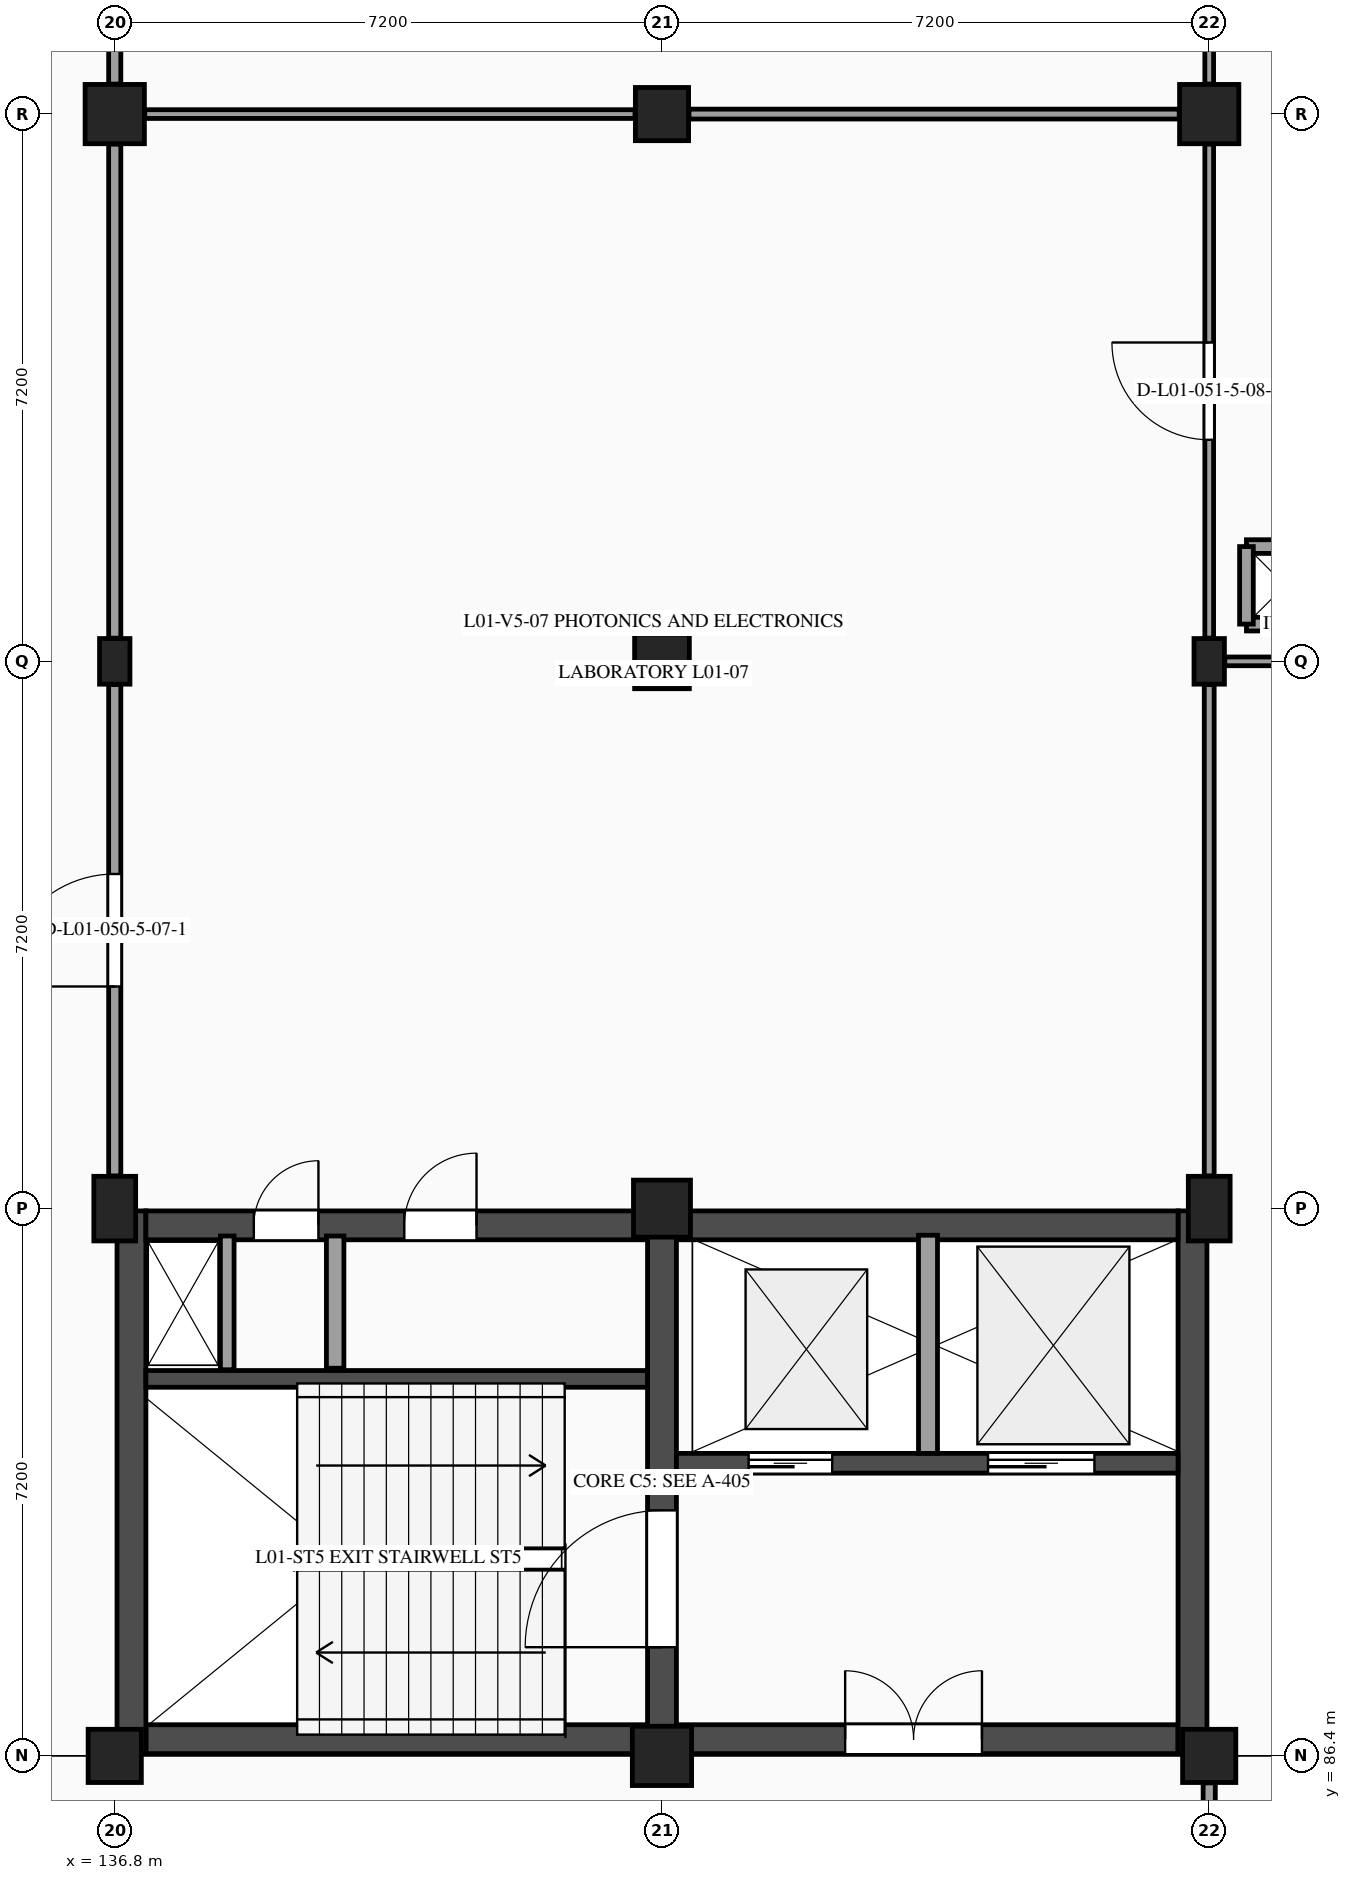
"""IFC4 building model, lengths in metres.
Left out: names, types, materials, properties, quantities, classifications, styles, units other than length and angle.
Written with IfcOpenShell. Run it as: python <this file> out.ifc"""

import sys

from ifc_helpers import new_model, si_unit, direction, frame, frame_2d, origin, origin_2d, place, context, subcontext, project, spatial, rectangle, extrude, element, fill, save


model = new_model("IFC4")
c1 = context("Model", 3, precision=1e-05, world=origin(), true_north=direction((0.0, 1.0)))
c2 = subcontext(c1, "Body", "Model", "MODEL_VIEW")
j1 = project(units=[si_unit("LENGTHUNIT", "METRE"), si_unit("PLANEANGLEUNIT", "RADIAN")], contexts=[c1])
p1 = place(None, origin())
s1 = spatial("IfcSite", under=j1, at=p1, CompositionType="ELEMENT")
p2 = place(p1, origin())
s2 = spatial("IfcBuilding", under=s1, at=p2, CompositionType="ELEMENT")
p3 = place(p2, frame((0.0, 0.0, 5.4)))
s3 = spatial("IfcBuildingStorey", under=s2, at=p3, CompositionType="ELEMENT", Elevation=5.4)
p4 = place(p3, frame((136.8, 86.4, 0.0), z_axis=(0.0, 0.0, 1.0), x_axis=(1.0, 0.0, 0.0)))
e1 = element("IfcColumn", 1, at=p4, inside=s3, PredefinedType="COLUMN", context=c2, shape_type="SweptSolid", body=[
    extrude(rectangle(XDim=0.7, YDim=0.7, at=origin_2d()), origin(), (0.0, 0.0, 1.0), 4.5),
])
p5 = place(p3, frame((136.8, 93.6, 0.0), z_axis=(0.0, 0.0, 1.0), x_axis=(1.0, 0.0, 0.0)))
e2 = element("IfcColumn", 2, at=p5, inside=s3, PredefinedType="COLUMN", context=c2, shape_type="SweptSolid", body=[
    extrude(rectangle(XDim=0.55, YDim=0.85, at=origin_2d()), origin(), (0.0, 0.0, 1.0), 4.5),
])
p6 = place(p3, frame((136.8, 100.8, 0.0), z_axis=(0.0, 0.0, 1.0), x_axis=(1.0, 0.0, 0.0)))
e3 = element("IfcColumn", 3, at=p6, inside=s3, PredefinedType="PILASTER", context=c2, shape_type="SweptSolid", body=[
    extrude(rectangle(XDim=0.4, YDim=0.6, at=origin_2d()), origin(), (0.0, 0.0, 1.0), 4.5),
])
for number, where, z_axis, x_axis in (
    (4, (136.8, 108.0, 0.0), (0.0, 0.0, 1.0), (1.0, 0.0, 0.0)),
    (5, (144.0, 86.4, 0.0), (0.0, 0.0, 1.0), (1.0, 0.0, 0.0)),
):
    element("IfcColumn", number, at=place(p3, frame(where, z_axis=z_axis, x_axis=x_axis)), inside=s3, PredefinedType="COLUMN", context=c2, shape_type="SweptSolid", body=[
        extrude(rectangle(XDim=0.78, YDim=0.78, at=origin_2d()), origin(), (0.0, 0.0, 1.0), 4.5),
    ])
p7 = place(p3, frame((144.0, 93.6, 0.0), z_axis=(0.0, 0.0, 1.0), x_axis=(1.0, 0.0, 0.0)))
e6 = element("IfcColumn", 6, at=p7, inside=s3, PredefinedType="COLUMN", context=c2, shape_type="SweptSolid", body=[
    extrude(rectangle(XDim=0.75, YDim=0.75, at=origin_2d()), origin(), (0.0, 0.0, 1.0), 4.5),
])
p8 = place(p3, frame((144.0, 100.8, 0.0), z_axis=(0.0, 0.0, 1.0), x_axis=(1.0, 0.0, 0.0)))
e7 = element("IfcColumn", 7, at=p8, inside=s3, PredefinedType="COLUMN", context=c2, shape_type="SweptSolid", body=[
    extrude(rectangle(XDim=0.72, YDim=0.72, at=origin_2d()), origin(), (0.0, 0.0, 1.0), 4.5),
])
for number, where, z_axis, x_axis in (
    (8, (144.0, 108.0, 0.0), (0.0, 0.0, 1.0), (1.0, 0.0, 0.0)),
    (9, (151.2, 86.4, 0.0), (0.0, 0.0, 1.0), (1.0, 0.0, 0.0)),
):
    element("IfcColumn", number, at=place(p3, frame(where, z_axis=z_axis, x_axis=x_axis)), inside=s3, PredefinedType="COLUMN", context=c2, shape_type="SweptSolid", body=[
        extrude(rectangle(XDim=0.7, YDim=0.7, at=origin_2d()), origin(), (0.0, 0.0, 1.0), 4.5),
    ])
p9 = place(p3, frame((151.2, 93.6, 0.0), z_axis=(0.0, 0.0, 1.0), x_axis=(1.0, 0.0, 0.0)))
e10 = element("IfcColumn", 10, at=p9, inside=s3, PredefinedType="COLUMN", context=c2, shape_type="SweptSolid", body=[
    extrude(rectangle(XDim=0.55, YDim=0.85, at=origin_2d()), origin(), (0.0, 0.0, 1.0), 4.5),
])
p10 = place(p3, frame((151.2, 100.8, 0.0), z_axis=(0.0, 0.0, 1.0), x_axis=(1.0, 0.0, 0.0)))
e11 = element("IfcColumn", 11, at=p10, inside=s3, PredefinedType="PILASTER", context=c2, shape_type="SweptSolid", body=[
    extrude(rectangle(XDim=0.4, YDim=0.6, at=origin_2d()), origin(), (0.0, 0.0, 1.0), 4.5),
])
p11 = place(p3, frame((151.2, 108.0, 0.0), z_axis=(0.0, 0.0, 1.0), x_axis=(1.0, 0.0, 0.0)))
e12 = element("IfcColumn", 12, at=p11, inside=s3, PredefinedType="COLUMN", context=c2, shape_type="SweptSolid", body=[
    extrude(rectangle(XDim=0.78, YDim=0.78, at=origin_2d()), origin(), (0.0, 0.0, 1.0), 4.5),
])
p12 = place(p3, frame((137.21, 86.62, 0.0), z_axis=(0.0, 0.0, 1.0), x_axis=(1.0, 0.0, 0.0)))
e13 = element("IfcWall", 13, at=p12, inside=s3, PredefinedType="SHEAR", context=c2, shape_type="SweptSolid", body=[
    extrude(rectangle(XDim=6.6, YDim=0.38, at=frame_2d((3.3, 0.0))), origin(), (0.0, 0.0, 1.0), 4.21),
])
p13 = place(p3, frame((137.02, 93.57, 0.0), z_axis=(0.0, 0.0, 1.0), x_axis=(0.0, -1.0, 0.0)))
e14 = element("IfcWall", 14, at=p13, inside=s3, PredefinedType="SHEAR", context=c2, shape_type="SweptSolid", body=[
    extrude(rectangle(XDim=7.14, YDim=0.38, at=frame_2d((3.57, 0.0))), origin(), (0.0, 0.0, 1.0), 4.21),
])
p14 = place(p3, frame((137.21, 93.38, 0.0), z_axis=(0.0, 0.0, 1.0), x_axis=(1.0, 0.0, 0.0)))
e15 = element("IfcWall", 15, at=p14, inside=s3, PredefinedType="SHEAR", context=c2, shape_type="SweptSolid", body=[
    extrude(rectangle(XDim=6.6, YDim=0.38, at=frame_2d((3.3, 0.0))), origin(), (0.0, 0.0, 1.0), 4.21),
])
p15 = place(p14, frame((1.42, 0.0, 0.0)))
e16 = element("IfcOpeningElement", 16, at=p15, cuts=e15, PredefinedType="OPENING", context=c2, shape_type="SweptSolid", body=[
    extrude(rectangle(XDim=0.85, YDim=2.1, at=frame_2d((0.425, 1.05))), frame((0.0, 0.2, 0.0), z_axis=(0.0, -1.0, 0.0), x_axis=(1.0, 0.0, 0.0)), (0.0, 0.0, 1.0), 0.4),
])
p16 = place(p14, frame((3.4, 0.0, 0.0)))
e17 = element("IfcOpeningElement", 17, at=p16, cuts=e15, PredefinedType="OPENING", context=c2, shape_type="SweptSolid", body=[
    extrude(rectangle(XDim=0.95, YDim=2.15, at=frame_2d((0.475, 1.075))), frame((0.0, 0.2, 0.0), z_axis=(0.0, -1.0, 0.0), x_axis=(1.0, 0.0, 0.0)), (0.0, 0.0, 1.0), 0.4),
])
p17 = place(p3, frame((137.21, 91.36, 0.0), z_axis=(0.0, 0.0, 1.0), x_axis=(1.0, 0.0, 0.0)))
e18 = element("IfcWall", 18, at=p17, inside=s3, PredefinedType="SHEAR", context=c2, shape_type="SweptSolid", body=[
    extrude(rectangle(XDim=6.6, YDim=0.22, at=frame_2d((3.3, 0.0))), origin(), (0.0, 0.0, 1.0), 4.21),
])
p18 = place(p3, frame((139.7, 91.5, 0.0), z_axis=(0.0, 0.0, 1.0), x_axis=(0.0, 1.0, 0.0)))
e19 = element("IfcWall", 19, at=p18, inside=s3, PredefinedType="PARTITIONING", context=c2, shape_type="SweptSolid", body=[
    extrude(rectangle(XDim=1.74, YDim=0.23, at=frame_2d((0.87, 0.0))), origin(), (0.0, 0.0, 1.0), 4.21),
])
p19 = place(p3, frame((138.28, 91.48, 0.0), z_axis=(0.0, 0.0, 1.0), x_axis=(0.0, 1.0, 0.0)))
e20 = element("IfcWall", 20, at=p19, inside=s3, PredefinedType="PARTITIONING", context=c2, shape_type="SweptSolid", body=[
    extrude(rectangle(XDim=1.76, YDim=0.18, at=frame_2d((0.88, 0.0))), origin(), (0.0, 0.0, 1.0), 4.21),
])
p20 = place(p3, frame((144.0, 86.43, 0.0), z_axis=(0.0, 0.0, 1.0), x_axis=(0.0, 1.0, 0.0)))
e21 = element("IfcWall", 21, at=p20, inside=s3, PredefinedType="SHEAR", context=c2, shape_type="SweptSolid", body=[
    extrude(rectangle(XDim=7.14, YDim=0.38, at=frame_2d((3.57, 0.0))), origin(), (0.0, 0.0, 1.0), 4.21),
])
p21 = place(p20, frame((1.4, 0.0, 0.0)))
e22 = element("IfcOpeningElement", 22, at=p21, cuts=e21, PredefinedType="OPENING", context=c2, shape_type="SweptSolid", body=[
    extrude(rectangle(XDim=1.8, YDim=2.2, at=frame_2d((0.9, 1.1))), frame((0.0, 0.2, 0.0), z_axis=(0.0, -1.0, 0.0), x_axis=(1.0, 0.0, 0.0)), (0.0, 0.0, 1.0), 0.4),
])
p22 = place(p3, frame((144.19, 86.62, 0.0), z_axis=(0.0, 0.0, 1.0), x_axis=(1.0, 0.0, 0.0)))
e23 = element("IfcWall", 23, at=p22, inside=s3, PredefinedType="SHEAR", context=c2, shape_type="SweptSolid", body=[
    extrude(rectangle(XDim=6.6, YDim=0.38, at=frame_2d((3.3, 0.0))), origin(), (0.0, 0.0, 1.0), 4.21),
])
p23 = place(p22, frame((2.22, 0.0, 0.0)))
e24 = element("IfcOpeningElement", 24, at=p23, cuts=e23, PredefinedType="OPENING", context=c2, shape_type="SweptSolid", body=[
    extrude(rectangle(XDim=1.8, YDim=2.2, at=frame_2d((0.9, 1.1))), frame((0.0, 0.2, 0.0), z_axis=(0.0, -1.0, 0.0), x_axis=(1.0, 0.0, 0.0)), (0.0, 0.0, 1.0), 0.4),
])
p24 = place(p3, frame((150.98, 86.43, 0.0), z_axis=(0.0, 0.0, 1.0), x_axis=(0.0, 1.0, 0.0)))
e25 = element("IfcWall", 25, at=p24, inside=s3, PredefinedType="SHEAR", context=c2, shape_type="SweptSolid", body=[
    extrude(rectangle(XDim=7.14, YDim=0.38, at=frame_2d((3.57, 0.0))), origin(), (0.0, 0.0, 1.0), 4.21),
])
p25 = place(p3, frame((144.19, 93.38, 0.0), z_axis=(0.0, 0.0, 1.0), x_axis=(1.0, 0.0, 0.0)))
e26 = element("IfcWall", 26, at=p25, inside=s3, PredefinedType="SHEAR", context=c2, shape_type="SweptSolid", body=[
    extrude(rectangle(XDim=6.6, YDim=0.38, at=frame_2d((3.3, 0.0))), origin(), (0.0, 0.0, 1.0), 4.21),
])
p26 = place(p3, frame((144.19, 90.25, 0.0), z_axis=(0.0, 0.0, 1.0), x_axis=(1.0, 0.0, 0.0)))
e27 = element("IfcWall", 27, at=p26, inside=s3, PredefinedType="SHEAR", context=c2, shape_type="SweptSolid", body=[
    extrude(rectangle(XDim=6.6, YDim=0.26, at=frame_2d((3.3, 0.0))), origin(), (0.0, 0.0, 1.0), 4.21),
])
p27 = place(p26, frame((0.95, 0.0, 0.0)))
e28 = element("IfcOpeningElement", 28, at=p27, cuts=e27, PredefinedType="OPENING", context=c2, shape_type="SweptSolid", body=[
    extrude(rectangle(XDim=1.1, YDim=2.2, at=frame_2d((0.55, 1.1))), frame((0.0, 0.14, 0.0), z_axis=(0.0, -1.0, 0.0), x_axis=(1.0, 0.0, 0.0)), (0.0, 0.0, 1.0), 0.28),
])
p28 = place(p26, frame((4.1, 0.0, 0.0)))
e29 = element("IfcOpeningElement", 29, at=p28, cuts=e27, PredefinedType="OPENING", context=c2, shape_type="SweptSolid", body=[
    extrude(rectangle(XDim=1.4, YDim=2.3, at=frame_2d((0.7, 1.15))), frame((0.0, 0.14, 0.0), z_axis=(0.0, -1.0, 0.0), x_axis=(1.0, 0.0, 0.0)), (0.0, 0.0, 1.0), 0.28),
])
p29 = place(p3, frame((147.5, 90.38, 0.0), z_axis=(0.0, 0.0, 1.0), x_axis=(0.0, 1.0, 0.0)))
e30 = element("IfcWall", 30, at=p29, inside=s3, PredefinedType="PARTITIONING", context=c2, shape_type="SweptSolid", body=[
    extrude(rectangle(XDim=2.87, YDim=0.25, at=frame_2d((1.435, 0.0))), origin(), (0.0, 0.0, 1.0), 4.21),
])
for number, where, z_axis, x_axis in (
    (31, (151.69, 101.29, 0.0), (0.0, 0.0, 1.0), (1.0, 0.0, 0.0)),
    (32, (152.71, 102.31, 0.0), (0.0, 0.0, 1.0), (-1.0, 0.0, 0.0)),
    (33, (151.69, 102.31, 0.0), (0.0, 0.0, 1.0), (0.0, -1.0, 0.0)),
):
    element("IfcWall", number, at=place(p3, frame(where, z_axis=z_axis, x_axis=x_axis)), inside=s3, PredefinedType="PARTITIONING", context=c2, shape_type="SweptSolid", body=[
        extrude(rectangle(XDim=1.02, YDim=0.18, at=frame_2d((0.51, 0.0))), origin(), (0.0, 0.0, 1.0), 4.21),
    ])
p30 = place(p3, frame((136.8, 94.03, 0.0), z_axis=(0.0, 0.0, 1.0), x_axis=(0.0, 1.0, 0.0)))
e34 = element("IfcWall", 34, at=p30, inside=s3, PredefinedType="PARTITIONING", context=c2, shape_type="SweptSolid", body=[
    extrude(rectangle(XDim=6.465, YDim=0.16, at=frame_2d((3.232, 0.0))), origin(), (0.0, 0.0, 1.0), 3.575),
])
p31 = place(p30, frame((2.492, 0.0, 0.0)))
e35 = element("IfcOpeningElement", 35, at=p31, cuts=e34, PredefinedType="OPENING", context=c2, shape_type="SweptSolid", body=[
    extrude(rectangle(XDim=1.48, YDim=2.28, at=frame_2d((0.74, 1.14))), frame((0.0, 0.09, 0.0), z_axis=(0.0, -1.0, 0.0), x_axis=(1.0, 0.0, 0.0)), (0.0, 0.0, 1.0), 0.18),
])
p32 = place(p3, frame((136.8, 101.105, 0.0), z_axis=(0.0, 0.0, 1.0), x_axis=(0.0, 1.0, 0.0)))
e36 = element("IfcWall", 36, at=p32, inside=s3, PredefinedType="PARTITIONING", context=c2, shape_type="SweptSolid", body=[
    extrude(rectangle(XDim=6.5, YDim=0.16, at=frame_2d((3.25, 0.0))), origin(), (0.0, 0.0, 1.0), 3.525),
])
p33 = place(p3, frame((136.8, 108.395, 0.0), z_axis=(0.0, 0.0, 1.0), x_axis=(0.0, 1.0, 0.0)))
e37 = element("IfcWall", 37, at=p33, inside=s3, PredefinedType="PARTITIONING", context=c2, shape_type="SweptSolid", body=[
    extrude(rectangle(XDim=6.425, YDim=0.16, at=frame_2d((3.212, 0.0))), origin(), (0.0, 0.0, 1.0), 3.525),
])
p34 = place(p33, frame((2.663, 0.0, 0.0)))
e38 = element("IfcOpeningElement", 38, at=p34, cuts=e37, PredefinedType="OPENING", context=c2, shape_type="SweptSolid", body=[
    extrude(rectangle(XDim=1.1, YDim=2.15, at=frame_2d((0.55, 1.075))), frame((0.0, 0.09, 0.0), z_axis=(0.0, -1.0, 0.0), x_axis=(1.0, 0.0, 0.0)), (0.0, 0.0, 1.0), 0.18),
])
p35 = place(p3, frame((137.195, 108.0, 0.0), z_axis=(0.0, 0.0, 1.0), x_axis=(1.0, 0.0, 0.0)))
e39 = element("IfcWall", 39, at=p35, inside=s3, PredefinedType="PARTITIONING", context=c2, shape_type="SweptSolid", body=[
    extrude(rectangle(XDim=6.45, YDim=0.115, at=frame_2d((3.225, 0.0))), origin(), (0.0, 0.0, 1.0), 3.43),
])
p36 = place(p3, frame((151.2, 79.565, 0.0), z_axis=(0.0, 0.0, 1.0), x_axis=(0.0, 1.0, 0.0)))
e40 = element("IfcWall", 40, at=p36, inside=s3, PredefinedType="PARTITIONING", context=c2, shape_type="SweptSolid", body=[
    extrude(rectangle(XDim=6.48, YDim=0.16, at=frame_2d((3.24, 0.0))), origin(), (0.0, 0.0, 1.0), 3.515),
])
p37 = place(p36, frame((2.55, 0.0, 0.0)))
e41 = element("IfcOpeningElement", 41, at=p37, cuts=e40, PredefinedType="OPENING", context=c2, shape_type="SweptSolid", body=[
    extrude(rectangle(XDim=1.38, YDim=2.22, at=frame_2d((0.69, 1.11))), frame((0.0, 0.09, 0.0), z_axis=(0.0, -1.0, 0.0), x_axis=(1.0, 0.0, 0.0)), (0.0, 0.0, 1.0), 0.18),
])
p38 = place(p3, frame((151.2, 94.03, 0.0), z_axis=(0.0, 0.0, 1.0), x_axis=(0.0, 1.0, 0.0)))
e42 = element("IfcWall", 42, at=p38, inside=s3, PredefinedType="PARTITIONING", context=c2, shape_type="SweptSolid", body=[
    extrude(rectangle(XDim=6.465, YDim=0.13, at=frame_2d((3.232, 0.0))), origin(), (0.0, 0.0, 1.0), 3.575),
])
p39 = place(p3, frame((151.2, 101.105, 0.0), z_axis=(0.0, 0.0, 1.0), x_axis=(0.0, 1.0, 0.0)))
e43 = element("IfcWall", 43, at=p39, inside=s3, PredefinedType="PARTITIONING", context=c2, shape_type="SweptSolid", body=[
    extrude(rectangle(XDim=6.5, YDim=0.115, at=frame_2d((3.25, 0.0))), origin(), (0.0, 0.0, 1.0), 3.525),
])
p40 = place(p39, frame((2.61, 0.0, 0.0)))
e44 = element("IfcOpeningElement", 44, at=p40, cuts=e43, PredefinedType="OPENING", context=c2, shape_type="SweptSolid", body=[
    extrude(rectangle(XDim=1.28, YDim=2.24, at=frame_2d((0.64, 1.12))), frame((0.0, 0.067, 0.0), z_axis=(0.0, -1.0, 0.0), x_axis=(1.0, 0.0, 0.0)), (0.0, 0.0, 1.0), 0.135),
])
p41 = place(p3, frame((144.355, 108.0, 0.0), z_axis=(0.0, 0.0, 1.0), x_axis=(1.0, 0.0, 0.0)))
e45 = element("IfcWall", 45, at=p41, inside=s3, PredefinedType="PARTITIONING", context=c2, shape_type="SweptSolid", body=[
    extrude(rectangle(XDim=6.45, YDim=0.13, at=frame_2d((3.225, 0.0))), origin(), (0.0, 0.0, 1.0), 3.46),
])
p42 = place(p3, frame((151.2, 108.395, 0.0), z_axis=(0.0, 0.0, 1.0), x_axis=(0.0, 1.0, 0.0)))
e46 = element("IfcWall", 46, at=p42, inside=s3, PredefinedType="PARTITIONING", context=c2, shape_type="SweptSolid", body=[
    extrude(rectangle(XDim=6.425, YDim=0.115, at=frame_2d((3.212, 0.0))), origin(), (0.0, 0.0, 1.0), 3.525),
])
p43 = place(p3, frame((151.405, 100.8, 0.0), z_axis=(0.0, 0.0, 1.0), x_axis=(1.0, 0.0, 0.0)))
e47 = element("IfcWall", 47, at=p43, inside=s3, PredefinedType="PARTITIONING", context=c2, shape_type="SweptSolid", body=[
    extrude(rectangle(XDim=6.63, YDim=0.115, at=frame_2d((3.315, 0.0))), origin(), (0.0, 0.0, 1.0), 3.47),
])
p44 = place(p15, origin())
e48 = element("IfcDoor", 48, at=p44, inside=s3, OperationType="SINGLE_SWING_RIGHT", PredefinedType="DOOR", context=c2, shape_type="SweptSolid", body=[
    extrude(rectangle(XDim=0.85, YDim=2.1, at=frame_2d((0.425, 1.05))), frame((0.0, 0.025, 0.0), z_axis=(0.0, -1.0, 0.0), x_axis=(1.0, 0.0, 0.0)), (0.0, 0.0, 1.0), 0.05),
])
fill(e16, e48)
p45 = place(p21, origin())
e49 = element("IfcDoor", 49, at=p45, inside=s3, OperationType="SINGLE_SWING_LEFT", PredefinedType="DOOR", context=c2, shape_type="SweptSolid", body=[
    extrude(rectangle(XDim=1.8, YDim=2.2, at=frame_2d((0.9, 1.1))), frame((0.0, 0.025, 0.0), z_axis=(0.0, -1.0, 0.0), x_axis=(1.0, 0.0, 0.0)), (0.0, 0.0, 1.0), 0.05),
])
fill(e22, e49)
p46 = place(p16, origin())
e50 = element("IfcDoor", 50, at=p46, inside=s3, OperationType="SINGLE_SWING_RIGHT", PredefinedType="DOOR", context=c2, shape_type="SweptSolid", body=[
    extrude(rectangle(XDim=0.95, YDim=2.15, at=frame_2d((0.475, 1.075))), frame((0.0, 0.025, 0.0), z_axis=(0.0, -1.0, 0.0), x_axis=(1.0, 0.0, 0.0)), (0.0, 0.0, 1.0), 0.05),
])
fill(e17, e50)
p47 = place(p27, origin())
e51 = element("IfcDoor", 51, at=p47, inside=s3, OperationType="SLIDING_TO_LEFT", PredefinedType="DOOR", context=c2, shape_type="SweptSolid", body=[
    extrude(rectangle(XDim=1.1, YDim=2.2, at=frame_2d((0.55, 1.1))), frame((0.0, 0.025, 0.0), z_axis=(0.0, -1.0, 0.0), x_axis=(1.0, 0.0, 0.0)), (0.0, 0.0, 1.0), 0.05),
])
fill(e28, e51)
p48 = place(p28, origin())
e52 = element("IfcDoor", 52, at=p48, inside=s3, OperationType="SLIDING_TO_RIGHT", PredefinedType="DOOR", context=c2, shape_type="SweptSolid", body=[
    extrude(rectangle(XDim=1.4, YDim=2.3, at=frame_2d((0.7, 1.15))), frame((0.0, 0.025, 0.0), z_axis=(0.0, -1.0, 0.0), x_axis=(1.0, 0.0, 0.0)), (0.0, 0.0, 1.0), 0.05),
])
fill(e29, e52)
p49 = place(p23, origin())
e53 = element("IfcDoor", 53, at=p49, inside=s3, OperationType="DOUBLE_DOOR_SINGLE_SWING", PredefinedType="DOOR", context=c2, shape_type="SweptSolid", body=[
    extrude(rectangle(XDim=1.8, YDim=2.2, at=frame_2d((0.9, 1.1))), frame((0.0, 0.025, 0.0), z_axis=(0.0, -1.0, 0.0), x_axis=(1.0, 0.0, 0.0)), (0.0, 0.0, 1.0), 0.05),
])
fill(e24, e53)
p50 = place(p31, origin())
e54 = element("IfcDoor", 54, at=p50, inside=s3, OperationType="SINGLE_SWING_LEFT", PredefinedType="DOOR", context=c2, shape_type="SweptSolid", body=[
    extrude(rectangle(XDim=1.48, YDim=2.28, at=frame_2d((0.74, 1.14))), frame((0.0, 0.025, 0.0), z_axis=(0.0, -1.0, 0.0), x_axis=(1.0, 0.0, 0.0)), (0.0, 0.0, 1.0), 0.05),
])
fill(e35, e54)
p51 = place(p40, origin())
e55 = element("IfcDoor", 55, at=p51, inside=s3, OperationType="SINGLE_SWING_RIGHT", PredefinedType="DOOR", context=c2, shape_type="SweptSolid", body=[
    extrude(rectangle(XDim=1.28, YDim=2.24, at=frame_2d((0.64, 1.12))), frame((0.0, 0.025, 0.0), z_axis=(0.0, -1.0, 0.0), x_axis=(1.0, 0.0, 0.0)), (0.0, 0.0, 1.0), 0.05),
])
fill(e44, e55)
save(model, sys.argv[1])
